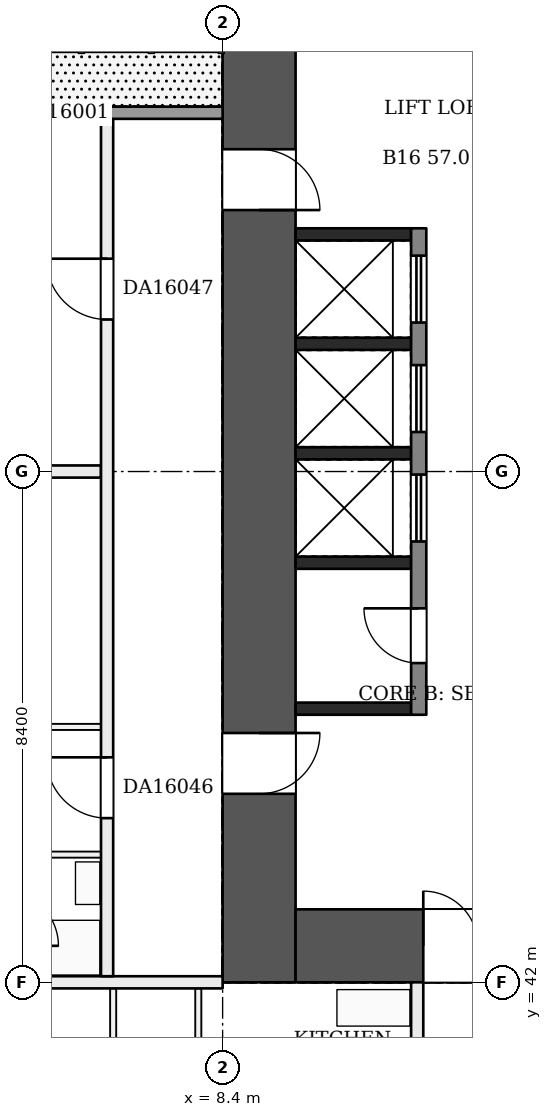
"""IFC4 building model, lengths in metres.
Left out: names, types, materials, properties, quantities, classifications, styles, units other than length and angle.
Written with IfcOpenShell. Run it as: python <this file> out.ifc"""

import sys

from ifc_helpers import new_model, si_unit, direction, frame, frame_2d, origin, place, context, subcontext, project, spatial, rectangle, extrude, element, fill, save


model = new_model("IFC4")
c1 = context("Model", 3, precision=1e-05, world=origin(), true_north=direction((0.0, 1.0)))
c2 = subcontext(c1, "Body", "Model", "MODEL_VIEW")
j1 = project(units=[si_unit("LENGTHUNIT", "METRE"), si_unit("PLANEANGLEUNIT", "RADIAN")], contexts=[c1])
p1 = place(None, origin())
s1 = spatial("IfcSite", under=j1, at=p1, CompositionType="ELEMENT")
p2 = place(p1, origin())
s2 = spatial("IfcBuilding", under=s1, at=p2, CompositionType="ELEMENT")
p3 = place(p2, frame((0.0, 0.0, 67.2)))
s3 = spatial("IfcBuildingStorey", under=s2, at=p3, CompositionType="ELEMENT", Elevation=67.2)
p4 = place(p3, frame((9.0, 58.8, 0.0), z_axis=(0.0, 0.0, 1.0), x_axis=(0.0, -1.0, 0.0)))
e1 = element("IfcWall", 1, at=p4, inside=s3, PredefinedType="SHEAR", context=c2, shape_type="SweptSolid", body=[
    extrude(rectangle(XDim=16.8, YDim=1.2, at=frame_2d((8.4, 0.0))), origin(), (0.0, 0.0, 1.0), 3.22),
])
p5 = place(p4, frame((3.1, 0.0, 0.0)))
e2 = element("IfcOpeningElement", 2, at=p5, cuts=e1, PredefinedType="OPENING", context=c2, shape_type="SweptSolid", body=[
    extrude(rectangle(XDim=1.0, YDim=2.1, at=frame_2d((0.5, 1.05))), frame((0.0, 0.61, 0.0), z_axis=(0.0, -1.0, 0.0), x_axis=(1.0, 0.0, 0.0)), (0.0, 0.0, 1.0), 1.22),
])
p6 = place(p4, frame((12.7, 0.0, 0.0)))
e3 = element("IfcOpeningElement", 3, at=p6, cuts=e1, PredefinedType="OPENING", context=c2, shape_type="SweptSolid", body=[
    extrude(rectangle(XDim=1.0, YDim=2.1, at=frame_2d((0.5, 1.05))), frame((0.0, 0.61, 0.0), z_axis=(0.0, -1.0, 0.0), x_axis=(1.0, 0.0, 0.0)), (0.0, 0.0, 1.0), 1.22),
])
p7 = place(p3, frame((9.6, 42.6, 0.0), z_axis=(0.0, 0.0, 1.0), x_axis=(1.0, 0.0, 0.0)))
e4 = element("IfcWall", 4, at=p7, inside=s3, PredefinedType="SHEAR", context=c2, shape_type="SweptSolid", body=[
    extrude(rectangle(XDim=14.4, YDim=1.2, at=frame_2d((7.2, 0.0))), origin(), (0.0, 0.0, 1.0), 3.22),
])
p8 = place(p7, frame((2.1, 0.0, 0.0)))
e5 = element("IfcOpeningElement", 5, at=p8, cuts=e4, PredefinedType="OPENING", context=c2, shape_type="SweptSolid", body=[
    extrude(rectangle(XDim=1.8, YDim=2.1, at=frame_2d((0.9, 1.05))), frame((0.0, 0.61, 0.0), z_axis=(0.0, -1.0, 0.0), x_axis=(1.0, 0.0, 0.0)), (0.0, 0.0, 1.0), 1.22),
])
for number, where, z_axis, x_axis in (
    (6, (9.6, 54.3, 0.0), (0.0, 0.0, 1.0), (1.0, 0.0, 0.0)),
    (7, (9.6, 52.5, 0.0), (0.0, 0.0, 1.0), (1.0, 0.0, 0.0)),
    (8, (9.6, 50.7, 0.0), (0.0, 0.0, 1.0), (1.0, 0.0, 0.0)),
    (9, (9.6, 48.9, 0.0), (0.0, 0.0, 1.0), (1.0, 0.0, 0.0)),
    (10, (9.6, 46.5, 0.0), (0.0, 0.0, 1.0), (1.0, 0.0, 0.0)),
):
    element("IfcWall", number, at=place(p3, frame(where, z_axis=z_axis, x_axis=x_axis)), inside=s3, PredefinedType="SHEAR", context=c2, shape_type="SweptSolid", body=[
        extrude(rectangle(XDim=1.9, YDim=0.2, at=frame_2d((0.95, 0.0))), origin(), (0.0, 0.0, 1.0), 3.22),
    ])
p9 = place(p3, frame((11.625, 54.4, 0.0), z_axis=(0.0, 0.0, 1.0), x_axis=(0.0, -1.0, 0.0)))
e11 = element("IfcWall", 11, at=p9, inside=s3, PredefinedType="SHEAR", context=c2, shape_type="SweptSolid", body=[
    extrude(rectangle(XDim=8.0, YDim=0.25, at=frame_2d((4.0, 0.0))), origin(), (0.0, 0.0, 1.0), 3.22),
])
p10 = place(p9, frame((0.45, 0.0, 0.0)))
e12 = element("IfcOpeningElement", 12, at=p10, cuts=e11, PredefinedType="OPENING", context=c2, shape_type="SweptSolid", body=[
    extrude(rectangle(XDim=1.1, YDim=2.1, at=frame_2d((0.55, 1.05))), frame((0.0, 0.135, 0.0), z_axis=(0.0, -1.0, 0.0), x_axis=(1.0, 0.0, 0.0)), (0.0, 0.0, 1.0), 0.27),
])
p11 = place(p9, frame((2.25, 0.0, 0.0)))
e13 = element("IfcOpeningElement", 13, at=p11, cuts=e11, PredefinedType="OPENING", context=c2, shape_type="SweptSolid", body=[
    extrude(rectangle(XDim=1.1, YDim=2.1, at=frame_2d((0.55, 1.05))), frame((0.0, 0.135, 0.0), z_axis=(0.0, -1.0, 0.0), x_axis=(1.0, 0.0, 0.0)), (0.0, 0.0, 1.0), 0.27),
])
p12 = place(p9, frame((4.05, 0.0, 0.0)))
e14 = element("IfcOpeningElement", 14, at=p12, cuts=e11, PredefinedType="OPENING", context=c2, shape_type="SweptSolid", body=[
    extrude(rectangle(XDim=1.1, YDim=2.1, at=frame_2d((0.55, 1.05))), frame((0.0, 0.135, 0.0), z_axis=(0.0, -1.0, 0.0), x_axis=(1.0, 0.0, 0.0)), (0.0, 0.0, 1.0), 0.27),
])
p13 = place(p9, frame((6.25, 0.0, 0.0)))
e15 = element("IfcOpeningElement", 15, at=p13, cuts=e11, PredefinedType="OPENING", context=c2, shape_type="SweptSolid", body=[
    extrude(rectangle(XDim=0.9, YDim=2.1, at=frame_2d((0.45, 1.05))), frame((0.0, 0.135, 0.0), z_axis=(0.0, -1.0, 0.0), x_axis=(1.0, 0.0, 0.0)), (0.0, 0.0, 1.0), 0.27),
])
p14 = place(p3, frame((2.5, 42.0, 0.0), z_axis=(0.0, 0.0, 1.0), x_axis=(1.0, 0.0, 0.0)))
e16 = element("IfcWall", 16, at=p14, inside=s3, PredefinedType="PARTITIONING", context=c2, shape_type="SweptSolid", body=[
    extrude(rectangle(XDim=5.9, YDim=0.2, at=frame_2d((2.95, 0.0))), origin(), (0.0, 0.0, 1.0), 3.22),
])
p15 = place(p3, frame((4.85, 44.1, 0.0), z_axis=(0.0, 0.0, 1.0), x_axis=(1.0, 0.0, 0.0)))
e17 = element("IfcWall", 17, at=p15, inside=s3, PredefinedType="PARTITIONING", context=c2, shape_type="SweptSolid", body=[
    extrude(rectangle(XDim=1.55, YDim=0.1, at=frame_2d((0.775, 0.0))), origin(), (0.0, 0.0, 1.0), 3.22),
])
p16 = place(p3, frame((2.5, 46.2, 0.0), z_axis=(0.0, 0.0, 1.0), x_axis=(1.0, 0.0, 0.0)))
e18 = element("IfcWall", 18, at=p16, inside=s3, PredefinedType="PARTITIONING", context=c2, shape_type="SweptSolid", body=[
    extrude(rectangle(XDim=3.9, YDim=0.1, at=frame_2d((1.95, 0.0))), origin(), (0.0, 0.0, 1.0), 3.22),
])
p17 = place(p16, frame((0.6, 0.0, 0.0)))
e19 = element("IfcOpeningElement", 19, at=p17, cuts=e18, PredefinedType="OPENING", context=c2, shape_type="SweptSolid", body=[
    extrude(rectangle(XDim=0.9, YDim=2.1, at=frame_2d((0.45, 1.05))), frame((0.0, 0.06, 0.0), z_axis=(0.0, -1.0, 0.0), x_axis=(1.0, 0.0, 0.0)), (0.0, 0.0, 1.0), 0.12),
])
p18 = place(p3, frame((2.5, 50.4, 0.0), z_axis=(0.0, 0.0, 1.0), x_axis=(1.0, 0.0, 0.0)))
e20 = element("IfcWall", 20, at=p18, inside=s3, PredefinedType="PARTITIONING", context=c2, shape_type="SweptSolid", body=[
    extrude(rectangle(XDim=3.9, YDim=0.2, at=frame_2d((1.95, 0.0))), origin(), (0.0, 0.0, 1.0), 3.22),
])
p19 = place(p3, frame((6.5, 42.1, 0.0), z_axis=(0.0, 0.0, 1.0), x_axis=(0.0, 1.0, 0.0)))
e21 = element("IfcWall", 21, at=p19, inside=s3, PredefinedType="PARTITIONING", context=c2, shape_type="SweptSolid", body=[
    extrude(rectangle(XDim=14.2, YDim=0.2, at=frame_2d((7.1, 0.0))), origin(), (0.0, 0.0, 1.0), 3.22),
])
p20 = place(p19, frame((2.6, 0.0, 0.0)))
e22 = element("IfcOpeningElement", 22, at=p20, cuts=e21, PredefinedType="OPENING", context=c2, shape_type="SweptSolid", body=[
    extrude(rectangle(XDim=1.0, YDim=2.1, at=frame_2d((0.5, 1.05))), frame((0.0, 0.11, 0.0), z_axis=(0.0, -1.0, 0.0), x_axis=(1.0, 0.0, 0.0)), (0.0, 0.0, 1.0), 0.22),
])
p21 = place(p19, frame((10.8, 0.0, 0.0)))
e23 = element("IfcOpeningElement", 23, at=p21, cuts=e21, PredefinedType="OPENING", context=c2, shape_type="SweptSolid", body=[
    extrude(rectangle(XDim=1.0, YDim=2.1, at=frame_2d((0.5, 1.05))), frame((0.0, 0.11, 0.0), z_axis=(0.0, -1.0, 0.0), x_axis=(1.0, 0.0, 0.0)), (0.0, 0.0, 1.0), 0.22),
])
p22 = place(p3, frame((6.6, 29.5, 0.0), z_axis=(0.0, 0.0, 1.0), x_axis=(0.0, 1.0, 0.0)))
e24 = element("IfcWall", 24, at=p22, inside=s3, PredefinedType="PARTITIONING", context=c2, shape_type="SweptSolid", body=[
    extrude(rectangle(XDim=12.4, YDim=0.1, at=frame_2d((6.2, 0.0))), origin(), (0.0, 0.0, 1.0), 3.22),
])
p23 = place(p22, frame((1.5, 0.0, 0.0)))
e25 = element("IfcOpeningElement", 25, at=p23, cuts=e24, PredefinedType="OPENING", context=c2, shape_type="SweptSolid", body=[
    extrude(rectangle(XDim=0.9, YDim=2.1, at=frame_2d((0.45, 1.05))), frame((0.0, 0.06, 0.0), z_axis=(0.0, -1.0, 0.0), x_axis=(1.0, 0.0, 0.0)), (0.0, 0.0, 1.0), 0.12),
])
p24 = place(p22, frame((5.7, 0.0, 0.0)))
e26 = element("IfcOpeningElement", 26, at=p24, cuts=e24, PredefinedType="OPENING", context=c2, shape_type="SweptSolid", body=[
    extrude(rectangle(XDim=0.9, YDim=2.1, at=frame_2d((0.45, 1.05))), frame((0.0, 0.06, 0.0), z_axis=(0.0, -1.0, 0.0), x_axis=(1.0, 0.0, 0.0)), (0.0, 0.0, 1.0), 0.12),
])
p25 = place(p22, frame((9.9, 0.0, 0.0)))
e27 = element("IfcOpeningElement", 27, at=p25, cuts=e24, PredefinedType="OPENING", context=c2, shape_type="SweptSolid", body=[
    extrude(rectangle(XDim=0.9, YDim=2.1, at=frame_2d((0.45, 1.05))), frame((0.0, 0.06, 0.0), z_axis=(0.0, -1.0, 0.0), x_axis=(1.0, 0.0, 0.0)), (0.0, 0.0, 1.0), 0.12),
])
p26 = place(p3, frame((8.0, 29.5, 0.0), z_axis=(0.0, 0.0, 1.0), x_axis=(0.0, 1.0, 0.0)))
e28 = element("IfcWall", 28, at=p26, inside=s3, PredefinedType="PARTITIONING", context=c2, shape_type="SweptSolid", body=[
    extrude(rectangle(XDim=12.4, YDim=0.1, at=frame_2d((6.2, 0.0))), origin(), (0.0, 0.0, 1.0), 3.22),
])
p27 = place(p26, frame((5.12, 0.0, 0.0)))
e29 = element("IfcOpeningElement", 29, at=p27, cuts=e28, PredefinedType="OPENING", context=c2, shape_type="SweptSolid", body=[
    extrude(rectangle(XDim=0.9, YDim=2.1, at=frame_2d((0.45, 1.05))), frame((0.0, 0.06, 0.0), z_axis=(0.0, -1.0, 0.0), x_axis=(1.0, 0.0, 0.0)), (0.0, 0.0, 1.0), 0.12),
])
p28 = place(p26, frame((0.4, 0.0, 0.0)))
e30 = element("IfcOpeningElement", 30, at=p28, cuts=e28, PredefinedType="OPENING", context=c2, shape_type="SweptSolid", body=[
    extrude(rectangle(XDim=0.9, YDim=2.1, at=frame_2d((0.45, 1.05))), frame((0.0, 0.06, 0.0), z_axis=(0.0, -1.0, 0.0), x_axis=(1.0, 0.0, 0.0)), (0.0, 0.0, 1.0), 0.12),
])
p29 = place(p26, frame((2.36, 0.0, 0.0)))
e31 = element("IfcOpeningElement", 31, at=p29, cuts=e28, PredefinedType="OPENING", context=c2, shape_type="SweptSolid", body=[
    extrude(rectangle(XDim=0.9, YDim=2.1, at=frame_2d((0.45, 1.05))), frame((0.0, 0.06, 0.0), z_axis=(0.0, -1.0, 0.0), x_axis=(1.0, 0.0, 0.0)), (0.0, 0.0, 1.0), 0.12),
])
p30 = place(p26, frame((7.58, 0.0, 0.0)))
e32 = element("IfcOpeningElement", 32, at=p30, cuts=e28, PredefinedType="OPENING", context=c2, shape_type="SweptSolid", body=[
    extrude(rectangle(XDim=0.9, YDim=2.1, at=frame_2d((0.45, 1.05))), frame((0.0, 0.06, 0.0), z_axis=(0.0, -1.0, 0.0), x_axis=(1.0, 0.0, 0.0)), (0.0, 0.0, 1.0), 0.12),
])
p31 = place(p26, frame((10.44, 0.0, 0.0)))
e33 = element("IfcOpeningElement", 33, at=p31, cuts=e28, PredefinedType="OPENING", context=c2, shape_type="SweptSolid", body=[
    extrude(rectangle(XDim=0.9, YDim=2.1, at=frame_2d((0.45, 1.05))), frame((0.0, 0.06, 0.0), z_axis=(0.0, -1.0, 0.0), x_axis=(1.0, 0.0, 0.0)), (0.0, 0.0, 1.0), 0.12),
])
p32 = place(p3, frame((11.6, 11.7, 0.0), z_axis=(0.0, 0.0, 1.0), x_axis=(0.0, 1.0, 0.0)))
e34 = element("IfcWall", 34, at=p32, inside=s3, PredefinedType="PARTITIONING", context=c2, shape_type="SweptSolid", body=[
    extrude(rectangle(XDim=30.3, YDim=0.2, at=frame_2d((15.15, 0.0))), origin(), (0.0, 0.0, 1.0), 3.22),
])
p33 = place(p32, frame((7.9, 0.0, 0.0)))
e35 = element("IfcOpeningElement", 35, at=p33, cuts=e34, PredefinedType="OPENING", context=c2, shape_type="SweptSolid", body=[
    extrude(rectangle(XDim=1.0, YDim=2.1, at=frame_2d((0.5, 1.05))), frame((0.0, 0.11, 0.0), z_axis=(0.0, -1.0, 0.0), x_axis=(1.0, 0.0, 0.0)), (0.0, 0.0, 1.0), 0.22),
])
p34 = place(p32, frame((14.0, 0.0, 0.0)))
e36 = element("IfcOpeningElement", 36, at=p34, cuts=e34, PredefinedType="OPENING", context=c2, shape_type="SweptSolid", body=[
    extrude(rectangle(XDim=1.0, YDim=2.1, at=frame_2d((0.5, 1.05))), frame((0.0, 0.11, 0.0), z_axis=(0.0, -1.0, 0.0), x_axis=(1.0, 0.0, 0.0)), (0.0, 0.0, 1.0), 0.22),
])
p35 = place(p32, frame((22.92, 0.0, 0.0)))
e37 = element("IfcOpeningElement", 37, at=p35, cuts=e34, PredefinedType="OPENING", context=c2, shape_type="SweptSolid", body=[
    extrude(rectangle(XDim=1.0, YDim=2.1, at=frame_2d((0.5, 1.05))), frame((0.0, 0.11, 0.0), z_axis=(0.0, -1.0, 0.0), x_axis=(1.0, 0.0, 0.0)), (0.0, 0.0, 1.0), 0.22),
])
p36 = place(p3, frame((8.4, 56.3, 0.0), z_axis=(0.0, 0.0, 1.0), x_axis=(-1.0, 0.0, 0.0)))
e38 = element("IfcWall", 38, at=p36, inside=s3, PredefinedType="SOLIDWALL", context=c2, shape_type="SweptSolid", body=[
    extrude(rectangle(XDim=3.6, YDim=0.2, at=frame_2d((1.8, 0.0))), origin(), (0.0, 0.0, 1.0), 3.22),
])
p37 = place(p36, frame((2.0, 0.0, 0.9)))
e39 = element("IfcOpeningElement", 39, at=p37, cuts=e38, PredefinedType="OPENING", context=c2, shape_type="SweptSolid", body=[
    extrude(rectangle(XDim=1.3, YDim=1.5, at=frame_2d((0.65, 0.75))), frame((0.0, 0.11, 0.0), z_axis=(0.0, -1.0, 0.0), x_axis=(1.0, 0.0, 0.0)), (0.0, 0.0, 1.0), 0.22),
])
p38 = place(p5, origin())
e40 = element("IfcDoor", 40, at=p38, inside=s3, OperationType="SINGLE_SWING_RIGHT", PredefinedType="DOOR", context=c2, shape_type="SweptSolid", body=[
    extrude(rectangle(XDim=1.0, YDim=2.1, at=frame_2d((0.5, 1.05))), frame((0.0, 0.025, 0.0), z_axis=(0.0, -1.0, 0.0), x_axis=(1.0, 0.0, 0.0)), (0.0, 0.0, 1.0), 0.05),
])
fill(e2, e40)
p39 = place(p6, origin())
e41 = element("IfcDoor", 41, at=p39, inside=s3, OperationType="SINGLE_SWING_LEFT", PredefinedType="DOOR", context=c2, shape_type="SweptSolid", body=[
    extrude(rectangle(XDim=1.0, YDim=2.1, at=frame_2d((0.5, 1.05))), frame((0.0, 0.025, 0.0), z_axis=(0.0, -1.0, 0.0), x_axis=(1.0, 0.0, 0.0)), (0.0, 0.0, 1.0), 0.05),
])
fill(e3, e41)
p40 = place(p8, origin())
e42 = element("IfcDoor", 42, at=p40, inside=s3, OperationType="DOUBLE_DOOR_SINGLE_SWING", PredefinedType="DOOR", context=c2, shape_type="SweptSolid", body=[
    extrude(rectangle(XDim=1.8, YDim=2.1, at=frame_2d((0.9, 1.05))), frame((0.0, 0.025, 0.0), z_axis=(0.0, -1.0, 0.0), x_axis=(1.0, 0.0, 0.0)), (0.0, 0.0, 1.0), 0.05),
])
fill(e5, e42)
p41 = place(p10, origin())
e43 = element("IfcDoor", 43, at=p41, inside=s3, OperationType="DOUBLE_DOOR_SLIDING", PredefinedType="DOOR", context=c2, shape_type="SweptSolid", body=[
    extrude(rectangle(XDim=1.1, YDim=2.1, at=frame_2d((0.55, 1.05))), frame((0.0, 0.025, 0.0), z_axis=(0.0, -1.0, 0.0), x_axis=(1.0, 0.0, 0.0)), (0.0, 0.0, 1.0), 0.05),
])
fill(e12, e43)
p42 = place(p11, origin())
e44 = element("IfcDoor", 44, at=p42, inside=s3, OperationType="DOUBLE_DOOR_SLIDING", PredefinedType="DOOR", context=c2, shape_type="SweptSolid", body=[
    extrude(rectangle(XDim=1.1, YDim=2.1, at=frame_2d((0.55, 1.05))), frame((0.0, 0.025, 0.0), z_axis=(0.0, -1.0, 0.0), x_axis=(1.0, 0.0, 0.0)), (0.0, 0.0, 1.0), 0.05),
])
fill(e13, e44)
p43 = place(p12, origin())
e45 = element("IfcDoor", 45, at=p43, inside=s3, OperationType="DOUBLE_DOOR_SLIDING", PredefinedType="DOOR", context=c2, shape_type="SweptSolid", body=[
    extrude(rectangle(XDim=1.1, YDim=2.1, at=frame_2d((0.55, 1.05))), frame((0.0, 0.025, 0.0), z_axis=(0.0, -1.0, 0.0), x_axis=(1.0, 0.0, 0.0)), (0.0, 0.0, 1.0), 0.05),
])
fill(e14, e45)
p44 = place(p13, frame((0.9, 0.0, 0.0), z_axis=(0.0, 0.0, 1.0), x_axis=(-1.0, 0.0, 0.0)))
e46 = element("IfcDoor", 46, at=p44, inside=s3, OperationType="SINGLE_SWING_RIGHT", PredefinedType="DOOR", context=c2, shape_type="SweptSolid", body=[
    extrude(rectangle(XDim=0.9, YDim=2.1, at=frame_2d((0.45, 1.05))), frame((0.0, 0.025, 0.0), z_axis=(0.0, -1.0, 0.0), x_axis=(1.0, 0.0, 0.0)), (0.0, 0.0, 1.0), 0.05),
])
fill(e15, e46)
p45 = place(p20, origin())
e47 = element("IfcDoor", 47, at=p45, inside=s3, OperationType="SINGLE_SWING_RIGHT", PredefinedType="DOOR", context=c2, shape_type="SweptSolid", body=[
    extrude(rectangle(XDim=1.0, YDim=2.1, at=frame_2d((0.5, 1.05))), frame((0.0, 0.025, 0.0), z_axis=(0.0, -1.0, 0.0), x_axis=(1.0, 0.0, 0.0)), (0.0, 0.0, 1.0), 0.05),
])
fill(e22, e47)
p46 = place(p21, origin())
e48 = element("IfcDoor", 48, at=p46, inside=s3, OperationType="SINGLE_SWING_RIGHT", PredefinedType="DOOR", context=c2, shape_type="SweptSolid", body=[
    extrude(rectangle(XDim=1.0, YDim=2.1, at=frame_2d((0.5, 1.05))), frame((0.0, 0.025, 0.0), z_axis=(0.0, -1.0, 0.0), x_axis=(1.0, 0.0, 0.0)), (0.0, 0.0, 1.0), 0.05),
])
fill(e23, e48)
p47 = place(p37, origin())
e49 = element("IfcWindow", 49, at=p47, inside=s3, PartitioningType="SINGLE_PANEL", PredefinedType="WINDOW", context=c2, shape_type="SweptSolid", body=[
    extrude(rectangle(XDim=1.3, YDim=1.5, at=frame_2d((0.65, 0.75))), frame((0.0, 0.03, 0.0), z_axis=(0.0, -1.0, 0.0), x_axis=(1.0, 0.0, 0.0)), (0.0, 0.0, 1.0), 0.06),
])
fill(e39, e49)
save(model, sys.argv[1])
